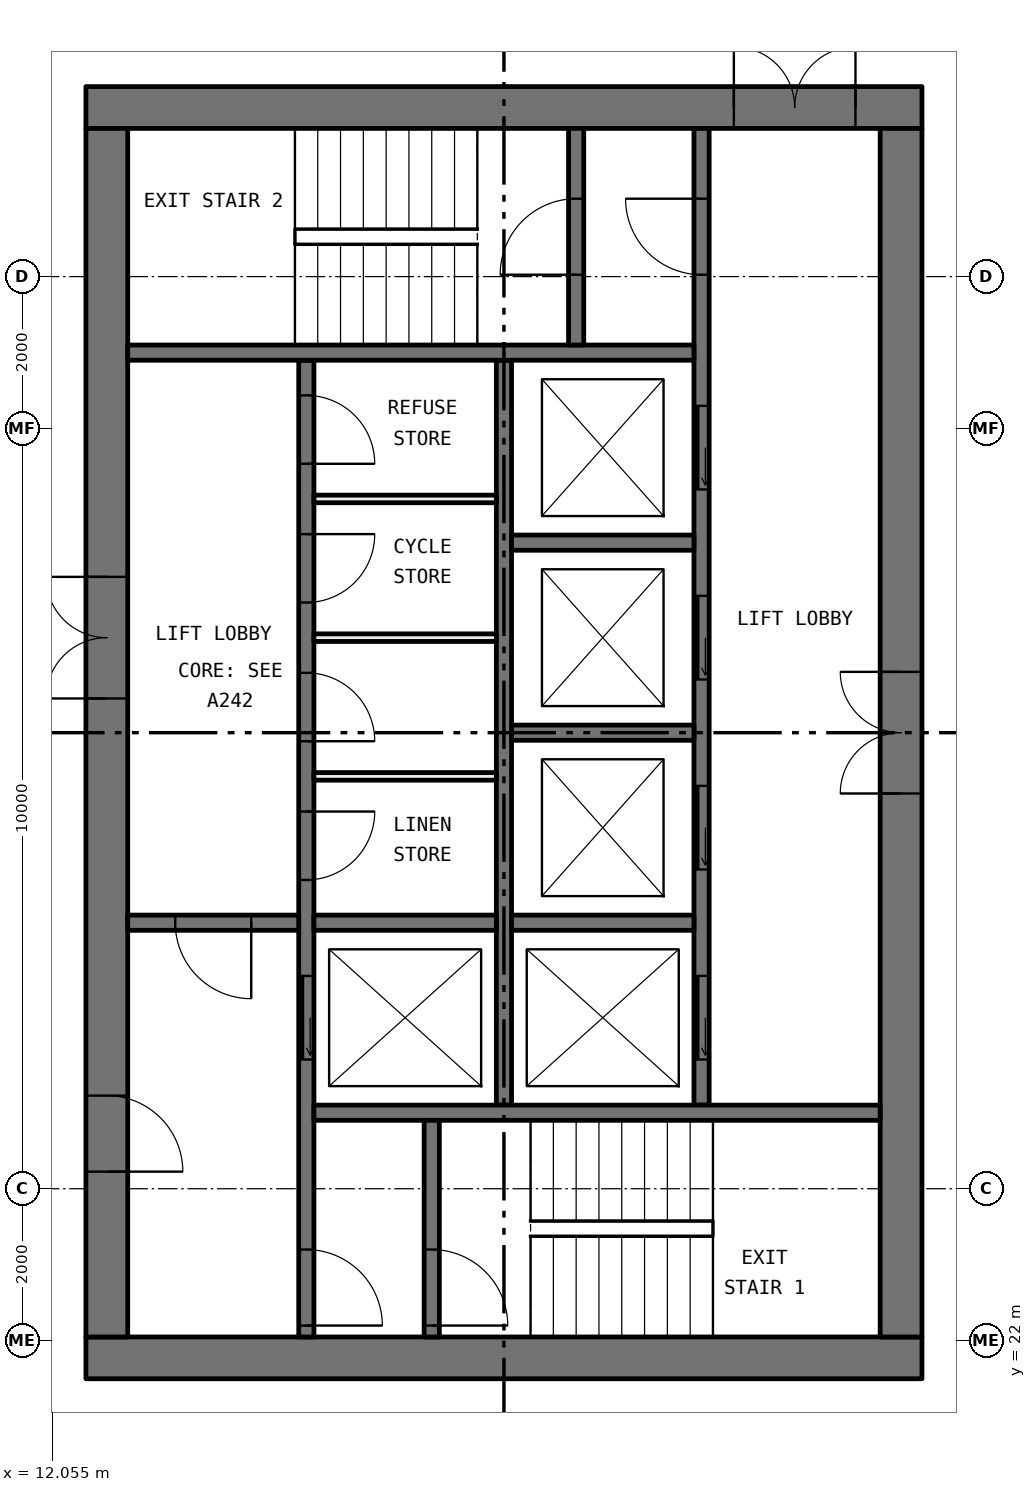
"""IFC4 building model, lengths in metres.
Left out: names, types, materials, properties, quantities, classifications, styles, units other than length and angle.
Written with IfcOpenShell. Run it as: python <this file> out.ifc"""

import sys

from ifc_helpers import new_model, si_unit, direction, frame, frame_2d, origin, place, context, subcontext, project, spatial, rectangle, extrude, element, fill, save


model = new_model("IFC4")
c1 = context("Model", 3, precision=1e-05, world=origin(), true_north=direction((0.0, 1.0)))
c2 = subcontext(c1, "Body", "Model", "MODEL_VIEW")
j1 = project(units=[si_unit("LENGTHUNIT", "METRE"), si_unit("PLANEANGLEUNIT", "RADIAN")], contexts=[c1])
p1 = place(None, origin())
s1 = spatial("IfcSite", under=j1, at=p1, CompositionType="ELEMENT")
p2 = place(p1, origin())
s2 = spatial("IfcBuilding", under=s1, at=p2, CompositionType="ELEMENT")
p3 = place(p2, frame((0.0, 0.0, 158.25)))
s3 = spatial("IfcBuildingStorey", under=s2, at=p3, CompositionType="ELEMENT", Elevation=158.25)
p4 = place(p3, frame((12.5, 21.775, 0.0), z_axis=(0.0, 0.0, 1.0), x_axis=(1.0, 0.0, 0.0)))
e1 = element("IfcWall", 1, at=p4, inside=s3, PredefinedType="SHEAR", context=c2, shape_type="SweptSolid", body=[
    extrude(rectangle(XDim=11.0, YDim=0.55, at=frame_2d((5.5, 0.0))), origin(), (0.0, 0.0, 1.0), 3.05),
])
p5 = place(p3, frame((12.5, 38.225, 0.0), z_axis=(0.0, 0.0, 1.0), x_axis=(1.0, 0.0, 0.0)))
e2 = element("IfcWall", 2, at=p5, inside=s3, PredefinedType="SHEAR", context=c2, shape_type="SweptSolid", body=[
    extrude(rectangle(XDim=11.0, YDim=0.55, at=frame_2d((5.5, 0.0))), origin(), (0.0, 0.0, 1.0), 3.05),
])
p6 = place(p5, frame((8.525, 0.0, 0.0)))
e3 = element("IfcOpeningElement", 3, at=p6, cuts=e2, PredefinedType="OPENING", context=c2, shape_type="SweptSolid", body=[
    extrude(rectangle(XDim=1.6, YDim=2.1, at=frame_2d((0.8, 1.05))), frame((0.0, 0.285, 0.0), z_axis=(0.0, -1.0, 0.0), x_axis=(1.0, 0.0, 0.0)), (0.0, 0.0, 1.0), 0.57),
])
p7 = place(p3, frame((12.775, 22.05, 0.0), z_axis=(0.0, 0.0, 1.0), x_axis=(0.0, 1.0, 0.0)))
e4 = element("IfcWall", 4, at=p7, inside=s3, PredefinedType="SHEAR", context=c2, shape_type="SweptSolid", body=[
    extrude(rectangle(XDim=15.9, YDim=0.55, at=frame_2d((7.95, 0.0))), origin(), (0.0, 0.0, 1.0), 3.05),
])
p8 = place(p7, frame((8.4, 0.0, 0.0)))
e5 = element("IfcOpeningElement", 5, at=p8, cuts=e4, PredefinedType="OPENING", context=c2, shape_type="SweptSolid", body=[
    extrude(rectangle(XDim=1.6, YDim=2.1, at=frame_2d((0.8, 1.05))), frame((0.0, 0.285, 0.0), z_axis=(0.0, -1.0, 0.0), x_axis=(1.0, 0.0, 0.0)), (0.0, 0.0, 1.0), 0.57),
])
p9 = place(p7, frame((2.175, 0.0, 0.0)))
e6 = element("IfcOpeningElement", 6, at=p9, cuts=e4, PredefinedType="OPENING", context=c2, shape_type="SweptSolid", body=[
    extrude(rectangle(XDim=1.0, YDim=2.1, at=frame_2d((0.5, 1.05))), frame((0.0, 0.285, 0.0), z_axis=(0.0, -1.0, 0.0), x_axis=(1.0, 0.0, 0.0)), (0.0, 0.0, 1.0), 0.57),
])
p10 = place(p3, frame((23.225, 22.05, 0.0), z_axis=(0.0, 0.0, 1.0), x_axis=(0.0, 1.0, 0.0)))
e7 = element("IfcWall", 7, at=p10, inside=s3, PredefinedType="SHEAR", context=c2, shape_type="SweptSolid", body=[
    extrude(rectangle(XDim=15.9, YDim=0.55, at=frame_2d((7.95, 0.0))), origin(), (0.0, 0.0, 1.0), 3.05),
])
p11 = place(p10, frame((7.15, 0.0, 0.0)))
e8 = element("IfcOpeningElement", 8, at=p11, cuts=e7, PredefinedType="OPENING", context=c2, shape_type="SweptSolid", body=[
    extrude(rectangle(XDim=1.6, YDim=2.1, at=frame_2d((0.8, 1.05))), frame((0.0, 0.285, 0.0), z_axis=(0.0, -1.0, 0.0), x_axis=(1.0, 0.0, 0.0)), (0.0, 0.0, 1.0), 0.57),
])
p12 = place(p3, frame((15.4, 22.05, 0.0), z_axis=(0.0, 0.0, 1.0), x_axis=(0.0, 1.0, 0.0)))
e9 = element("IfcWall", 9, at=p12, inside=s3, PredefinedType="SOLIDWALL", context=c2, shape_type="SweptSolid", body=[
    extrude(rectangle(XDim=12.85, YDim=0.2, at=frame_2d((6.425, 0.0))), origin(), (0.0, 0.0, 1.0), 3.05),
])
p13 = place(p12, frame((3.65, 0.0, 0.0)))
e10 = element("IfcOpeningElement", 10, at=p13, cuts=e9, PredefinedType="OPENING", context=c2, shape_type="SweptSolid", body=[
    extrude(rectangle(XDim=1.1, YDim=2.1, at=frame_2d((0.55, 1.05))), frame((0.0, 0.11, 0.0), z_axis=(0.0, -1.0, 0.0), x_axis=(1.0, 0.0, 0.0)), (0.0, 0.0, 1.0), 0.22),
])
p14 = place(p12, frame((0.15, 0.0, 0.0)))
e11 = element("IfcOpeningElement", 11, at=p14, cuts=e9, PredefinedType="OPENING", context=c2, shape_type="SweptSolid", body=[
    extrude(rectangle(XDim=1.0, YDim=2.1, at=frame_2d((0.5, 1.05))), frame((0.0, 0.11, 0.0), z_axis=(0.0, -1.0, 0.0), x_axis=(1.0, 0.0, 0.0)), (0.0, 0.0, 1.0), 0.22),
])
p15 = place(p12, frame((6.012, 0.0, 0.0)))
e12 = element("IfcOpeningElement", 12, at=p15, cuts=e9, PredefinedType="OPENING", context=c2, shape_type="SweptSolid", body=[
    extrude(rectangle(XDim=0.9, YDim=2.1, at=frame_2d((0.45, 1.05))), frame((0.0, 0.11, 0.0), z_axis=(0.0, -1.0, 0.0), x_axis=(1.0, 0.0, 0.0)), (0.0, 0.0, 1.0), 0.22),
])
p16 = place(p12, frame((7.837, 0.0, 0.0)))
e13 = element("IfcOpeningElement", 13, at=p16, cuts=e9, PredefinedType="OPENING", context=c2, shape_type="SweptSolid", body=[
    extrude(rectangle(XDim=0.9, YDim=2.1, at=frame_2d((0.45, 1.05))), frame((0.0, 0.11, 0.0), z_axis=(0.0, -1.0, 0.0), x_axis=(1.0, 0.0, 0.0)), (0.0, 0.0, 1.0), 0.22),
])
p17 = place(p12, frame((9.663, 0.0, 0.0)))
e14 = element("IfcOpeningElement", 14, at=p17, cuts=e9, PredefinedType="OPENING", context=c2, shape_type="SweptSolid", body=[
    extrude(rectangle(XDim=0.9, YDim=2.1, at=frame_2d((0.45, 1.05))), frame((0.0, 0.11, 0.0), z_axis=(0.0, -1.0, 0.0), x_axis=(1.0, 0.0, 0.0)), (0.0, 0.0, 1.0), 0.22),
])
p18 = place(p12, frame((11.488, 0.0, 0.0)))
e15 = element("IfcOpeningElement", 15, at=p18, cuts=e9, PredefinedType="OPENING", context=c2, shape_type="SweptSolid", body=[
    extrude(rectangle(XDim=0.9, YDim=2.1, at=frame_2d((0.45, 1.05))), frame((0.0, 0.11, 0.0), z_axis=(0.0, -1.0, 0.0), x_axis=(1.0, 0.0, 0.0)), (0.0, 0.0, 1.0), 0.22),
])
p19 = place(p3, frame((20.6, 25.1, 0.0), z_axis=(0.0, 0.0, 1.0), x_axis=(0.0, 1.0, 0.0)))
e16 = element("IfcWall", 16, at=p19, inside=s3, PredefinedType="SOLIDWALL", context=c2, shape_type="SweptSolid", body=[
    extrude(rectangle(XDim=12.85, YDim=0.2, at=frame_2d((6.425, 0.0))), origin(), (0.0, 0.0, 1.0), 3.05),
])
p20 = place(p19, frame((0.6, 0.0, 0.0)))
e17 = element("IfcOpeningElement", 17, at=p20, cuts=e16, PredefinedType="OPENING", context=c2, shape_type="SweptSolid", body=[
    extrude(rectangle(XDim=1.1, YDim=2.1, at=frame_2d((0.55, 1.05))), frame((0.0, 0.11, 0.0), z_axis=(0.0, -1.0, 0.0), x_axis=(1.0, 0.0, 0.0)), (0.0, 0.0, 1.0), 0.22),
])
p21 = place(p19, frame((3.1, 0.0, 0.0)))
e18 = element("IfcOpeningElement", 18, at=p21, cuts=e16, PredefinedType="OPENING", context=c2, shape_type="SweptSolid", body=[
    extrude(rectangle(XDim=1.1, YDim=2.1, at=frame_2d((0.55, 1.05))), frame((0.0, 0.11, 0.0), z_axis=(0.0, -1.0, 0.0), x_axis=(1.0, 0.0, 0.0)), (0.0, 0.0, 1.0), 0.22),
])
p22 = place(p19, frame((5.6, 0.0, 0.0)))
e19 = element("IfcOpeningElement", 19, at=p22, cuts=e16, PredefinedType="OPENING", context=c2, shape_type="SweptSolid", body=[
    extrude(rectangle(XDim=1.1, YDim=2.1, at=frame_2d((0.55, 1.05))), frame((0.0, 0.11, 0.0), z_axis=(0.0, -1.0, 0.0), x_axis=(1.0, 0.0, 0.0)), (0.0, 0.0, 1.0), 0.22),
])
p23 = place(p19, frame((8.1, 0.0, 0.0)))
e20 = element("IfcOpeningElement", 20, at=p23, cuts=e16, PredefinedType="OPENING", context=c2, shape_type="SweptSolid", body=[
    extrude(rectangle(XDim=1.1, YDim=2.1, at=frame_2d((0.55, 1.05))), frame((0.0, 0.11, 0.0), z_axis=(0.0, -1.0, 0.0), x_axis=(1.0, 0.0, 0.0)), (0.0, 0.0, 1.0), 0.22),
])
p24 = place(p19, frame((10.925, 0.0, 0.0)))
e21 = element("IfcOpeningElement", 21, at=p24, cuts=e16, PredefinedType="OPENING", context=c2, shape_type="SweptSolid", body=[
    extrude(rectangle(XDim=1.0, YDim=2.1, at=frame_2d((0.5, 1.05))), frame((0.0, 0.11, 0.0), z_axis=(0.0, -1.0, 0.0), x_axis=(1.0, 0.0, 0.0)), (0.0, 0.0, 1.0), 0.22),
])
p25 = place(p3, frame((18.0, 25.1, 0.0), z_axis=(0.0, 0.0, 1.0), x_axis=(0.0, 1.0, 0.0)))
e22 = element("IfcWall", 22, at=p25, inside=s3, PredefinedType="SOLIDWALL", context=c2, shape_type="SweptSolid", body=[
    extrude(rectangle(XDim=9.8, YDim=0.2, at=frame_2d((4.9, 0.0))), origin(), (0.0, 0.0, 1.0), 3.05),
])
for number, where, z_axis, x_axis in (
    (23, (15.5, 25.0, 0.0), (0.0, 0.0, 1.0), (1.0, 0.0, 0.0)),
    (24, (13.05, 35.0, 0.0), (0.0, 0.0, 1.0), (1.0, 0.0, 0.0)),
):
    element("IfcWall", number, at=place(p3, frame(where, z_axis=z_axis, x_axis=x_axis)), inside=s3, PredefinedType="SOLIDWALL", context=c2, shape_type="SweptSolid", body=[
        extrude(rectangle(XDim=7.45, YDim=0.2, at=frame_2d((3.725, 0.0))), origin(), (0.0, 0.0, 1.0), 3.05),
    ])
p26 = place(p3, frame((13.05, 27.5, 0.0), z_axis=(0.0, 0.0, 1.0), x_axis=(1.0, 0.0, 0.0)))
e25 = element("IfcWall", 25, at=p26, inside=s3, PredefinedType="SOLIDWALL", context=c2, shape_type="SweptSolid", body=[
    extrude(rectangle(XDim=2.25, YDim=0.2, at=frame_2d((1.125, 0.0))), origin(), (0.0, 0.0, 1.0), 3.05),
])
p27 = place(p26, frame((0.625, 0.0, 0.0)))
e26 = element("IfcOpeningElement", 26, at=p27, cuts=e25, PredefinedType="OPENING", context=c2, shape_type="SweptSolid", body=[
    extrude(rectangle(XDim=1.0, YDim=2.1, at=frame_2d((0.5, 1.05))), frame((0.0, 0.11, 0.0), z_axis=(0.0, -1.0, 0.0), x_axis=(1.0, 0.0, 0.0)), (0.0, 0.0, 1.0), 0.22),
])
p28 = place(p3, frame((17.05, 22.05, 0.0), z_axis=(0.0, 0.0, 1.0), x_axis=(0.0, 1.0, 0.0)))
e27 = element("IfcWall", 27, at=p28, inside=s3, PredefinedType="SOLIDWALL", context=c2, shape_type="SweptSolid", body=[
    extrude(rectangle(XDim=2.85, YDim=0.2, at=frame_2d((1.425, 0.0))), origin(), (0.0, 0.0, 1.0), 3.05),
])
p29 = place(p28, frame((0.15, 0.0, 0.0)))
e28 = element("IfcOpeningElement", 28, at=p29, cuts=e27, PredefinedType="OPENING", context=c2, shape_type="SweptSolid", body=[
    extrude(rectangle(XDim=1.0, YDim=2.1, at=frame_2d((0.5, 1.05))), frame((0.0, 0.11, 0.0), z_axis=(0.0, -1.0, 0.0), x_axis=(1.0, 0.0, 0.0)), (0.0, 0.0, 1.0), 0.22),
])
p30 = place(p3, frame((18.95, 35.1, 0.0), z_axis=(0.0, 0.0, 1.0), x_axis=(0.0, 1.0, 0.0)))
e29 = element("IfcWall", 29, at=p30, inside=s3, PredefinedType="SOLIDWALL", context=c2, shape_type="SweptSolid", body=[
    extrude(rectangle(XDim=2.85, YDim=0.2, at=frame_2d((1.425, 0.0))), origin(), (0.0, 0.0, 1.0), 3.05),
])
p31 = place(p30, frame((0.925, 0.0, 0.0)))
e30 = element("IfcOpeningElement", 30, at=p31, cuts=e29, PredefinedType="OPENING", context=c2, shape_type="SweptSolid", body=[
    extrude(rectangle(XDim=1.0, YDim=2.1, at=frame_2d((0.5, 1.05))), frame((0.0, 0.11, 0.0), z_axis=(0.0, -1.0, 0.0), x_axis=(1.0, 0.0, 0.0)), (0.0, 0.0, 1.0), 0.22),
])
for number, where, z_axis, x_axis in (
    (31, (15.5, 27.5, 0.0), (0.0, 0.0, 1.0), (1.0, 0.0, 0.0)),
    (32, (18.1, 27.5, 0.0), (0.0, 0.0, 1.0), (1.0, 0.0, 0.0)),
    (33, (18.1, 30.0, 0.0), (0.0, 0.0, 1.0), (1.0, 0.0, 0.0)),
    (34, (18.1, 32.5, 0.0), (0.0, 0.0, 1.0), (1.0, 0.0, 0.0)),
):
    element("IfcWall", number, at=place(p3, frame(where, z_axis=z_axis, x_axis=x_axis)), inside=s3, PredefinedType="SOLIDWALL", context=c2, shape_type="SweptSolid", body=[
        extrude(rectangle(XDim=2.4, YDim=0.2, at=frame_2d((1.2, 0.0))), origin(), (0.0, 0.0, 1.0), 3.05),
    ])
for number, where, z_axis, x_axis in (
    (35, (15.5, 29.425, 0.0), (0.0, 0.0, 1.0), (1.0, 0.0, 0.0)),
    (36, (15.5, 31.25, 0.0), (0.0, 0.0, 1.0), (1.0, 0.0, 0.0)),
    (37, (15.5, 33.075, 0.0), (0.0, 0.0, 1.0), (1.0, 0.0, 0.0)),
):
    element("IfcWall", number, at=place(p3, frame(where, z_axis=z_axis, x_axis=x_axis)), inside=s3, PredefinedType="PARTITIONING", context=c2, shape_type="SweptSolid", body=[
        extrude(rectangle(XDim=2.4, YDim=0.1, at=frame_2d((1.2, 0.0))), origin(), (0.0, 0.0, 1.0), 3.05),
    ])
p32 = place(p20, origin())
e38 = element("IfcDoor", 38, at=p32, inside=s3, OperationType="SLIDING_TO_LEFT", PredefinedType="DOOR", context=c2, shape_type="SweptSolid", body=[
    extrude(rectangle(XDim=1.1, YDim=2.1, at=frame_2d((0.55, 1.05))), frame((0.0, 0.025, 0.0), z_axis=(0.0, -1.0, 0.0), x_axis=(1.0, 0.0, 0.0)), (0.0, 0.0, 1.0), 0.05),
])
fill(e17, e38)
p33 = place(p21, origin())
e39 = element("IfcDoor", 39, at=p33, inside=s3, OperationType="SLIDING_TO_LEFT", PredefinedType="DOOR", context=c2, shape_type="SweptSolid", body=[
    extrude(rectangle(XDim=1.1, YDim=2.1, at=frame_2d((0.55, 1.05))), frame((0.0, 0.025, 0.0), z_axis=(0.0, -1.0, 0.0), x_axis=(1.0, 0.0, 0.0)), (0.0, 0.0, 1.0), 0.05),
])
fill(e18, e39)
p34 = place(p22, origin())
e40 = element("IfcDoor", 40, at=p34, inside=s3, OperationType="SLIDING_TO_LEFT", PredefinedType="DOOR", context=c2, shape_type="SweptSolid", body=[
    extrude(rectangle(XDim=1.1, YDim=2.1, at=frame_2d((0.55, 1.05))), frame((0.0, 0.025, 0.0), z_axis=(0.0, -1.0, 0.0), x_axis=(1.0, 0.0, 0.0)), (0.0, 0.0, 1.0), 0.05),
])
fill(e19, e40)
p35 = place(p23, origin())
e41 = element("IfcDoor", 41, at=p35, inside=s3, OperationType="SLIDING_TO_LEFT", PredefinedType="DOOR", context=c2, shape_type="SweptSolid", body=[
    extrude(rectangle(XDim=1.1, YDim=2.1, at=frame_2d((0.55, 1.05))), frame((0.0, 0.025, 0.0), z_axis=(0.0, -1.0, 0.0), x_axis=(1.0, 0.0, 0.0)), (0.0, 0.0, 1.0), 0.05),
])
fill(e20, e41)
p36 = place(p13, origin())
e42 = element("IfcDoor", 42, at=p36, inside=s3, OperationType="SLIDING_TO_LEFT", PredefinedType="DOOR", context=c2, shape_type="SweptSolid", body=[
    extrude(rectangle(XDim=1.1, YDim=2.1, at=frame_2d((0.55, 1.05))), frame((0.0, 0.025, 0.0), z_axis=(0.0, -1.0, 0.0), x_axis=(1.0, 0.0, 0.0)), (0.0, 0.0, 1.0), 0.05),
])
fill(e10, e42)
p37 = place(p29, frame((1.0, 0.0, 0.0), x_axis=(-1.0, 0.0, 0.0)))
e43 = element("IfcDoor", 43, at=p37, inside=s3, OperationType="SINGLE_SWING_LEFT", PredefinedType="DOOR", context=c2, shape_type="SweptSolid", body=[
    extrude(rectangle(XDim=1.0, YDim=2.1, at=frame_2d((0.5, 1.05))), frame((0.0, 0.025, 0.0), z_axis=(0.0, -1.0, 0.0), x_axis=(1.0, 0.0, 0.0)), (0.0, 0.0, 1.0), 0.05),
])
fill(e28, e43)
p38 = place(p14, frame((1.0, 0.0, 0.0), x_axis=(-1.0, 0.0, 0.0)))
e44 = element("IfcDoor", 44, at=p38, inside=s3, OperationType="SINGLE_SWING_LEFT", PredefinedType="DOOR", context=c2, shape_type="SweptSolid", body=[
    extrude(rectangle(XDim=1.0, YDim=2.1, at=frame_2d((0.5, 1.05))), frame((0.0, 0.025, 0.0), z_axis=(0.0, -1.0, 0.0), x_axis=(1.0, 0.0, 0.0)), (0.0, 0.0, 1.0), 0.05),
])
fill(e11, e44)
p39 = place(p24, origin())
e45 = element("IfcDoor", 45, at=p39, inside=s3, OperationType="SINGLE_SWING_LEFT", PredefinedType="DOOR", context=c2, shape_type="SweptSolid", body=[
    extrude(rectangle(XDim=1.0, YDim=2.1, at=frame_2d((0.5, 1.05))), frame((0.0, 0.025, 0.0), z_axis=(0.0, -1.0, 0.0), x_axis=(1.0, 0.0, 0.0)), (0.0, 0.0, 1.0), 0.05),
])
fill(e21, e45)
p40 = place(p31, origin())
e46 = element("IfcDoor", 46, at=p40, inside=s3, OperationType="SINGLE_SWING_RIGHT", PredefinedType="DOOR", context=c2, shape_type="SweptSolid", body=[
    extrude(rectangle(XDim=1.0, YDim=2.1, at=frame_2d((0.5, 1.05))), frame((0.0, 0.025, 0.0), z_axis=(0.0, -1.0, 0.0), x_axis=(1.0, 0.0, 0.0)), (0.0, 0.0, 1.0), 0.05),
])
fill(e30, e46)
p41 = place(p27, frame((1.0, 0.0, 0.0), x_axis=(-1.0, 0.0, 0.0)))
e47 = element("IfcDoor", 47, at=p41, inside=s3, OperationType="SINGLE_SWING_RIGHT", PredefinedType="DOOR", context=c2, shape_type="SweptSolid", body=[
    extrude(rectangle(XDim=1.0, YDim=2.1, at=frame_2d((0.5, 1.05))), frame((0.0, 0.025, 0.0), z_axis=(0.0, -1.0, 0.0), x_axis=(1.0, 0.0, 0.0)), (0.0, 0.0, 1.0), 0.05),
])
fill(e26, e47)
p42 = place(p8, origin())
e48 = element("IfcDoor", 48, at=p42, inside=s3, OperationType="DOUBLE_DOOR_SINGLE_SWING", PredefinedType="DOOR", context=c2, shape_type="SweptSolid", body=[
    extrude(rectangle(XDim=1.6, YDim=2.1, at=frame_2d((0.8, 1.05))), frame((0.0, 0.025, 0.0), z_axis=(0.0, -1.0, 0.0), x_axis=(1.0, 0.0, 0.0)), (0.0, 0.0, 1.0), 0.05),
])
fill(e5, e48)
p43 = place(p9, frame((1.0, 0.0, 0.0), x_axis=(-1.0, 0.0, 0.0)))
e49 = element("IfcDoor", 49, at=p43, inside=s3, OperationType="SINGLE_SWING_LEFT", PredefinedType="DOOR", context=c2, shape_type="SweptSolid", body=[
    extrude(rectangle(XDim=1.0, YDim=2.1, at=frame_2d((0.5, 1.05))), frame((0.0, 0.025, 0.0), z_axis=(0.0, -1.0, 0.0), x_axis=(1.0, 0.0, 0.0)), (0.0, 0.0, 1.0), 0.05),
])
fill(e6, e49)
p44 = place(p6, origin())
e50 = element("IfcDoor", 50, at=p44, inside=s3, OperationType="DOUBLE_DOOR_SINGLE_SWING", PredefinedType="DOOR", context=c2, shape_type="SweptSolid", body=[
    extrude(rectangle(XDim=1.6, YDim=2.1, at=frame_2d((0.8, 1.05))), frame((0.0, 0.025, 0.0), z_axis=(0.0, -1.0, 0.0), x_axis=(1.0, 0.0, 0.0)), (0.0, 0.0, 1.0), 0.05),
])
fill(e3, e50)
p45 = place(p11, origin())
e51 = element("IfcDoor", 51, at=p45, inside=s3, OperationType="DOUBLE_DOOR_SINGLE_SWING", PredefinedType="DOOR", context=c2, shape_type="SweptSolid", body=[
    extrude(rectangle(XDim=1.6, YDim=2.1, at=frame_2d((0.8, 1.05))), frame((0.0, 0.025, 0.0), z_axis=(0.0, -1.0, 0.0), x_axis=(1.0, 0.0, 0.0)), (0.0, 0.0, 1.0), 0.05),
])
fill(e8, e51)
p46 = place(p15, frame((0.9, 0.0, 0.0), x_axis=(-1.0, 0.0, 0.0)))
e52 = element("IfcDoor", 52, at=p46, inside=s3, OperationType="SINGLE_SWING_RIGHT", PredefinedType="DOOR", context=c2, shape_type="SweptSolid", body=[
    extrude(rectangle(XDim=0.9, YDim=2.1, at=frame_2d((0.45, 1.05))), frame((0.0, 0.025, 0.0), z_axis=(0.0, -1.0, 0.0), x_axis=(1.0, 0.0, 0.0)), (0.0, 0.0, 1.0), 0.05),
])
fill(e12, e52)
p47 = place(p16, frame((0.9, 0.0, 0.0), x_axis=(-1.0, 0.0, 0.0)))
e53 = element("IfcDoor", 53, at=p47, inside=s3, OperationType="SINGLE_SWING_LEFT", PredefinedType="DOOR", context=c2, shape_type="SweptSolid", body=[
    extrude(rectangle(XDim=0.9, YDim=2.1, at=frame_2d((0.45, 1.05))), frame((0.0, 0.025, 0.0), z_axis=(0.0, -1.0, 0.0), x_axis=(1.0, 0.0, 0.0)), (0.0, 0.0, 1.0), 0.05),
])
fill(e13, e53)
p48 = place(p17, frame((0.9, 0.0, 0.0), x_axis=(-1.0, 0.0, 0.0)))
e54 = element("IfcDoor", 54, at=p48, inside=s3, OperationType="SINGLE_SWING_RIGHT", PredefinedType="DOOR", context=c2, shape_type="SweptSolid", body=[
    extrude(rectangle(XDim=0.9, YDim=2.1, at=frame_2d((0.45, 1.05))), frame((0.0, 0.025, 0.0), z_axis=(0.0, -1.0, 0.0), x_axis=(1.0, 0.0, 0.0)), (0.0, 0.0, 1.0), 0.05),
])
fill(e14, e54)
p49 = place(p18, frame((0.9, 0.0, 0.0), x_axis=(-1.0, 0.0, 0.0)))
e55 = element("IfcDoor", 55, at=p49, inside=s3, OperationType="SINGLE_SWING_LEFT", PredefinedType="DOOR", context=c2, shape_type="SweptSolid", body=[
    extrude(rectangle(XDim=0.9, YDim=2.1, at=frame_2d((0.45, 1.05))), frame((0.0, 0.025, 0.0), z_axis=(0.0, -1.0, 0.0), x_axis=(1.0, 0.0, 0.0)), (0.0, 0.0, 1.0), 0.05),
])
fill(e15, e55)
save(model, sys.argv[1])
